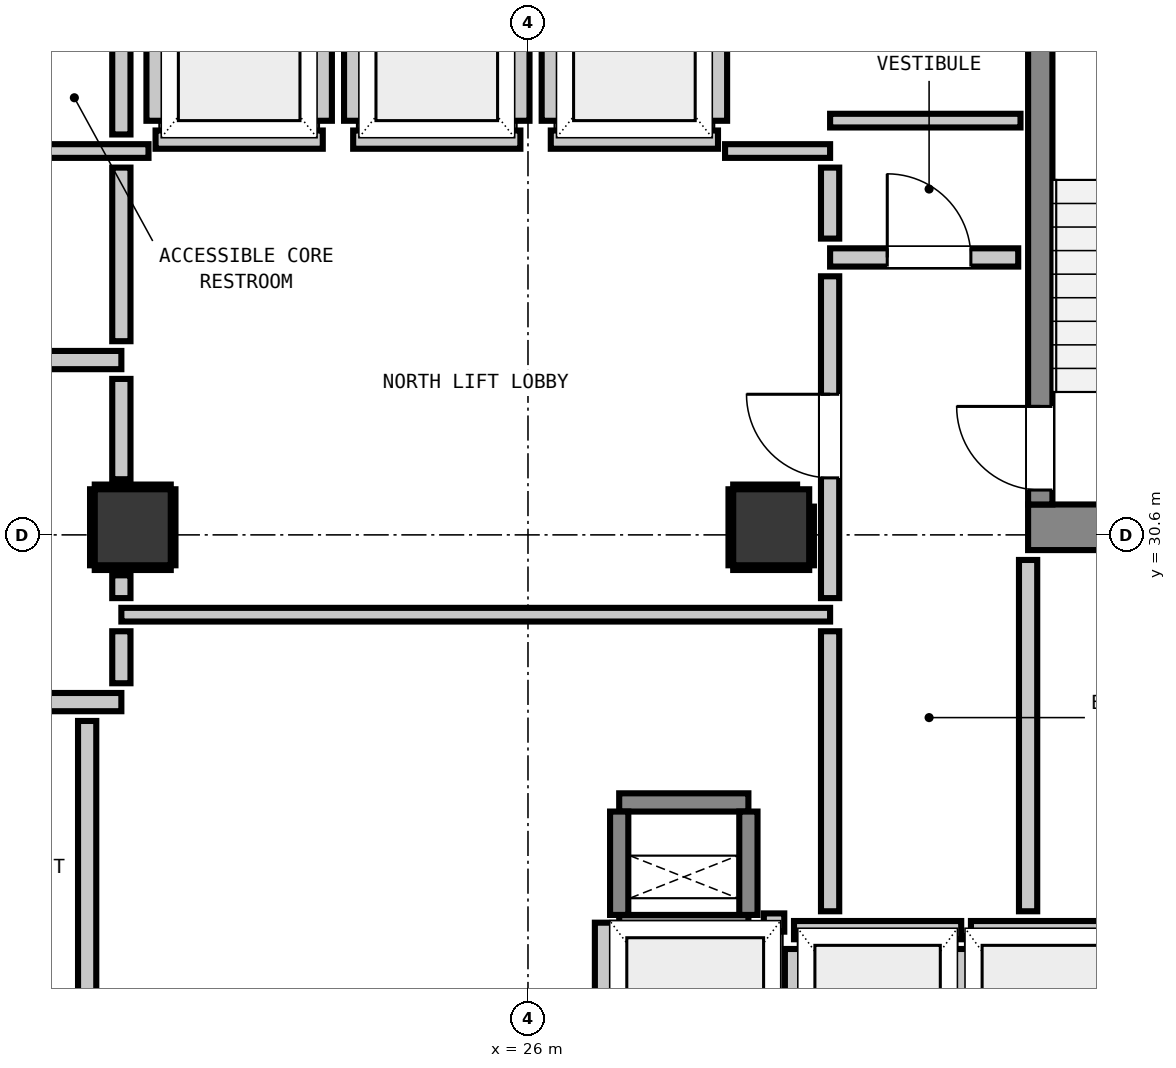
"""IFC4 building model, lengths in metres.
Left out: names, types, materials, properties, quantities, classifications, styles, units other than length and angle.
Written with IfcOpenShell. Run it as: python <this file> out.ifc"""

import sys

from ifc_helpers import new_model, si_unit, direction, frame, frame_2d, origin, origin_2d, place, context, subcontext, project, spatial, rectangle, extrude, element, fill, save


model = new_model("IFC4")
c1 = context("Model", 3, precision=1e-05, world=origin(), true_north=direction((0.0, 1.0)))
c2 = subcontext(c1, "Body", "Model", "MODEL_VIEW")
j1 = project(units=[si_unit("LENGTHUNIT", "METRE"), si_unit("PLANEANGLEUNIT", "RADIAN")], contexts=[c1])
p1 = place(None, origin())
s1 = spatial("IfcSite", under=j1, at=p1, CompositionType="ELEMENT")
p2 = place(p1, origin())
s2 = spatial("IfcBuilding", under=s1, at=p2, CompositionType="ELEMENT")
p3 = place(p2, frame((0.0, 0.0, 71.8)))
s3 = spatial("IfcBuildingStorey", under=s2, at=p3, CompositionType="ELEMENT", Elevation=71.8)
p4 = place(p3, frame((32.58, 30.7, 0.0), z_axis=(0.0, 0.0, 1.0), x_axis=(1.0, 0.0, 0.0)))
e1 = element("IfcWall", 1, at=p4, inside=s3, PredefinedType="SHEAR", context=c2, shape_type="SweptSolid", body=[
    extrude(rectangle(XDim=3.415, YDim=0.6, at=frame_2d((1.708, 0.0))), origin(), (0.0, 0.0, 1.0), 3.32),
])
p5 = place(p3, frame((32.74, 31.0, 0.0), z_axis=(0.0, 0.0, 1.0), x_axis=(0.0, 1.0, 0.0)))
e2 = element("IfcWall", 2, at=p5, inside=s3, PredefinedType="SHEAR", context=c2, shape_type="SweptSolid", body=[
    extrude(rectangle(XDim=7.8, YDim=0.32, at=frame_2d((3.9, 0.0))), origin(), (0.0, 0.0, 1.0), 3.32),
])
p6 = place(p5, frame((0.19, 0.0, 0.0)))
e3 = element("IfcOpeningElement", 3, at=p6, cuts=e2, PredefinedType="OPENING", context=c2, shape_type="SweptSolid", body=[
    extrude(rectangle(XDim=1.1, YDim=2.15, at=frame_2d((0.55, 1.075))), frame((0.0, 0.17, 0.0), z_axis=(0.0, -1.0, 0.0), x_axis=(1.0, 0.0, 0.0)), (0.0, 0.0, 1.0), 0.34),
])
for number, where, z_axis, x_axis in (
    (4, (27.2, 25.48, 0.0), (0.0, 0.0, 1.0), (1.0, 0.0, 0.0)),
    (5, (27.2, 27.08, 0.0), (0.0, 0.0, 1.0), (1.0, 0.0, 0.0)),
):
    element("IfcWall", number, at=place(p3, frame(where, z_axis=z_axis, x_axis=x_axis)), inside=s3, PredefinedType="SHEAR", context=c2, shape_type="SweptSolid", body=[
        extrude(rectangle(XDim=1.7, YDim=0.24, at=frame_2d((0.85, 0.0))), origin(), (0.0, 0.0, 1.0), 3.32),
    ])
for number, where, z_axis, x_axis in (
    (6, (27.2, 25.6, 0.0), (0.0, 0.0, 1.0), (0.0, 1.0, 0.0)),
    (7, (28.9, 25.6, 0.0), (0.0, 0.0, 1.0), (0.0, 1.0, 0.0)),
):
    element("IfcWall", number, at=place(p3, frame(where, z_axis=z_axis, x_axis=x_axis)), inside=s3, PredefinedType="SHEAR", context=c2, shape_type="SweptSolid", body=[
        extrude(rectangle(XDim=1.36, YDim=0.24, at=frame_2d((0.68, 0.0))), origin(), (0.0, 0.0, 1.0), 3.32),
    ])
for number, where, z_axis, x_axis in (
    (8, (20.8, 30.7, 0.0), (0.0, 0.0, 1.0), (1.0, 0.0, 0.0)),
    (9, (29.2, 30.7, 0.0), (0.0, 0.0, 1.0), (1.0, 0.0, 0.0)),
):
    element("IfcColumn", number, at=place(p3, frame(where, z_axis=z_axis, x_axis=x_axis)), inside=s3, PredefinedType="COLUMN", context=c2, shape_type="SweptSolid", body=[
        extrude(rectangle(XDim=1.0, YDim=1.0, at=origin_2d()), origin(), (0.0, 0.0, 1.0), 3.32),
    ])
p7 = place(p3, frame((21.1, 35.8, 0.0), z_axis=(0.0, 0.0, 1.0), x_axis=(1.0, 0.0, 0.0)))
e10 = element("IfcWall", 10, at=p7, inside=s3, PredefinedType="PARTITIONING", context=c2, shape_type="SweptSolid", body=[
    extrude(rectangle(XDim=2.2, YDim=0.24, at=frame_2d((1.1, 0.0))), origin(), (0.0, 0.0, 1.0), 3.06),
])
p8 = place(p3, frame((21.1, 36.048, 0.0), z_axis=(0.0, 0.0, 1.0), x_axis=(0.0, 1.0, 0.0)))
e11 = element("IfcWall", 11, at=p8, inside=s3, PredefinedType="PARTITIONING", context=c2, shape_type="SweptSolid", body=[
    extrude(rectangle(XDim=2.104, YDim=0.24, at=frame_2d((1.052, 0.0))), origin(), (0.0, 0.0, 1.0), 2.295),
])
p9 = place(p3, frame((23.3, 36.048, 0.0), z_axis=(0.0, 0.0, 1.0), x_axis=(0.0, 1.0, 0.0)))
e12 = element("IfcWall", 12, at=p9, inside=s3, PredefinedType="PARTITIONING", context=c2, shape_type="SweptSolid", body=[
    extrude(rectangle(XDim=2.104, YDim=0.24, at=frame_2d((1.052, 0.0))), origin(), (0.0, 0.0, 1.0), 3.06),
])
p10 = place(p3, frame((23.7, 35.8, 0.0), z_axis=(0.0, 0.0, 1.0), x_axis=(1.0, 0.0, 0.0)))
e13 = element("IfcWall", 13, at=p10, inside=s3, PredefinedType="PARTITIONING", context=c2, shape_type="SweptSolid", body=[
    extrude(rectangle(XDim=2.2, YDim=0.24, at=frame_2d((1.1, 0.0))), origin(), (0.0, 0.0, 1.0), 3.06),
])
for number, where, z_axis, x_axis in (
    (14, (23.7, 36.048, 0.0), (0.0, 0.0, 1.0), (0.0, 1.0, 0.0)),
    (15, (25.9, 36.048, 0.0), (0.0, 0.0, 1.0), (0.0, 1.0, 0.0)),
):
    element("IfcWall", number, at=place(p3, frame(where, z_axis=z_axis, x_axis=x_axis)), inside=s3, PredefinedType="PARTITIONING", context=c2, shape_type="SweptSolid", body=[
        extrude(rectangle(XDim=2.104, YDim=0.24, at=frame_2d((1.052, 0.0))), origin(), (0.0, 0.0, 1.0), 3.06),
    ])
p11 = place(p3, frame((26.3, 35.8, 0.0), z_axis=(0.0, 0.0, 1.0), x_axis=(1.0, 0.0, 0.0)))
e16 = element("IfcWall", 16, at=p11, inside=s3, PredefinedType="PARTITIONING", context=c2, shape_type="SweptSolid", body=[
    extrude(rectangle(XDim=2.2, YDim=0.24, at=frame_2d((1.1, 0.0))), origin(), (0.0, 0.0, 1.0), 3.06),
])
for number, where, z_axis, x_axis in (
    (17, (26.3, 36.048, 0.0), (0.0, 0.0, 1.0), (0.0, 1.0, 0.0)),
    (18, (28.5, 36.048, 0.0), (0.0, 0.0, 1.0), (0.0, 1.0, 0.0)),
):
    element("IfcWall", number, at=place(p3, frame(where, z_axis=z_axis, x_axis=x_axis)), inside=s3, PredefinedType="PARTITIONING", context=c2, shape_type="SweptSolid", body=[
        extrude(rectangle(XDim=2.104, YDim=0.24, at=frame_2d((1.052, 0.0))), origin(), (0.0, 0.0, 1.0), 3.06),
    ])
p12 = place(p3, frame((29.5, 25.4, 0.0), z_axis=(0.0, 0.0, 1.0), x_axis=(1.0, 0.0, 0.0)))
e19 = element("IfcWall", 19, at=p12, inside=s3, PredefinedType="PARTITIONING", context=c2, shape_type="SweptSolid", body=[
    extrude(rectangle(XDim=2.2, YDim=0.24, at=frame_2d((1.1, 0.0))), origin(), (0.0, 0.0, 1.0), 3.06),
])
p13 = place(p3, frame((29.5, 22.632, 0.0), z_axis=(0.0, 0.0, 1.0), x_axis=(0.0, 1.0, 0.0)))
e20 = element("IfcWall", 20, at=p13, inside=s3, PredefinedType="PARTITIONING", context=c2, shape_type="SweptSolid", body=[
    extrude(rectangle(XDim=2.52, YDim=0.24, at=frame_2d((1.26, 0.0))), origin(), (0.0, 0.0, 1.0), 2.295),
])
p14 = place(p3, frame((31.7, 22.73, 0.0), z_axis=(0.0, 0.0, 1.0), x_axis=(0.0, 1.0, 0.0)))
e21 = element("IfcWall", 21, at=p14, inside=s3, PredefinedType="PARTITIONING", context=c2, shape_type="SweptSolid", body=[
    extrude(rectangle(XDim=2.422, YDim=0.24, at=frame_2d((1.211, 0.0))), origin(), (0.0, 0.0, 1.0), 3.06),
])
p15 = place(p3, frame((31.828, 25.4, 0.0), z_axis=(0.0, 0.0, 1.0), x_axis=(1.0, 0.0, 0.0)))
e22 = element("IfcWall", 22, at=p15, inside=s3, PredefinedType="PARTITIONING", context=c2, shape_type="SweptSolid", body=[
    extrude(rectangle(XDim=2.072, YDim=0.24, at=frame_2d((1.036, 0.0))), origin(), (0.0, 0.0, 1.0), 3.06),
])
p16 = place(p3, frame((29.103, 25.5, 0.0), z_axis=(0.0, 0.0, 1.0), x_axis=(1.0, 0.0, 0.0)))
e23 = element("IfcWall", 23, at=p16, inside=s3, PredefinedType="PARTITIONING", context=c2, shape_type="SweptSolid", body=[
    extrude(rectangle(XDim=0.269, YDim=0.24, at=frame_2d((0.135, 0.0))), origin(), (0.0, 0.0, 1.0), 3.06),
])
p17 = place(p3, frame((27.0, 22.73, 0.0), z_axis=(0.0, 0.0, 1.0), x_axis=(0.0, 1.0, 0.0)))
e24 = element("IfcWall", 24, at=p17, inside=s3, PredefinedType="PARTITIONING", context=c2, shape_type="SweptSolid", body=[
    extrude(rectangle(XDim=2.768, YDim=0.24, at=frame_2d((1.384, 0.0))), origin(), (0.0, 0.0, 1.0), 3.06),
])
p18 = place(p3, frame((17.45, 28.4, 0.0), z_axis=(0.0, 0.0, 1.0), x_axis=(1.0, 0.0, 0.0)))
e25 = element("IfcWall", 25, at=p18, inside=s3, PredefinedType="PARTITIONING", context=c2, shape_type="SweptSolid", body=[
    extrude(rectangle(XDim=3.2, YDim=0.24, at=frame_2d((1.6, 0.0))), origin(), (0.0, 0.0, 1.0), 3.06),
])
p19 = place(p18, frame((0.784, 0.0, 0.0)))
e26 = element("IfcOpeningElement", 26, at=p19, cuts=e25, PredefinedType="OPENING", context=c2, shape_type="SweptSolid", body=[
    extrude(rectangle(XDim=1.1, YDim=2.15, at=frame_2d((0.55, 1.075))), frame((0.0, 0.13, 0.0), z_axis=(0.0, -1.0, 0.0), x_axis=(1.0, 0.0, 0.0)), (0.0, 0.0, 1.0), 0.26),
])
p20 = place(p3, frame((17.45, 32.9, 0.0), z_axis=(0.0, 0.0, 1.0), x_axis=(1.0, 0.0, 0.0)))
e27 = element("IfcWall", 27, at=p20, inside=s3, PredefinedType="PARTITIONING", context=c2, shape_type="SweptSolid", body=[
    extrude(rectangle(XDim=3.2, YDim=0.24, at=frame_2d((1.6, 0.0))), origin(), (0.0, 0.0, 1.0), 3.06),
])
p21 = place(p20, frame((0.159, 0.0, 0.0)))
e28 = element("IfcOpeningElement", 28, at=p21, cuts=e27, PredefinedType="OPENING", context=c2, shape_type="SweptSolid", body=[
    extrude(rectangle(XDim=1.1, YDim=2.15, at=frame_2d((0.55, 1.075))), frame((0.0, 0.13, 0.0), z_axis=(0.0, -1.0, 0.0), x_axis=(1.0, 0.0, 0.0)), (0.0, 0.0, 1.0), 0.26),
])
p22 = place(p3, frame((29.975, 34.25, 0.0), z_axis=(0.0, 0.0, 1.0), x_axis=(1.0, 0.0, 0.0)))
e29 = element("IfcWall", 29, at=p22, inside=s3, PredefinedType="PARTITIONING", context=c2, shape_type="SweptSolid", body=[
    extrude(rectangle(XDim=2.475, YDim=0.24, at=frame_2d((1.237, 0.0))), origin(), (0.0, 0.0, 1.0), 3.06),
])
p23 = place(p22, frame((0.752, 0.0, 0.0)))
e30 = element("IfcOpeningElement", 30, at=p23, cuts=e29, PredefinedType="OPENING", context=c2, shape_type="SweptSolid", body=[
    extrude(rectangle(XDim=1.1, YDim=2.15, at=frame_2d((0.55, 1.075))), frame((0.0, 0.13, 0.0), z_axis=(0.0, -1.0, 0.0), x_axis=(1.0, 0.0, 0.0)), (0.0, 0.0, 1.0), 0.26),
])
p24 = place(p3, frame((20.65, 29.55, 0.0), z_axis=(0.0, 0.0, 1.0), x_axis=(1.0, 0.0, 0.0)))
e31 = element("IfcWall", 31, at=p24, inside=s3, PredefinedType="PARTITIONING", context=c2, shape_type="SweptSolid", body=[
    extrude(rectangle(XDim=9.325, YDim=0.18, at=frame_2d((4.663, 0.0))), origin(), (0.0, 0.0, 1.0), 3.06),
])
p25 = place(p3, frame((18.95, 35.65, 0.0), z_axis=(0.0, 0.0, 1.0), x_axis=(1.0, 0.0, 0.0)))
e32 = element("IfcWall", 32, at=p25, inside=s3, PredefinedType="PARTITIONING", context=c2, shape_type="SweptSolid", body=[
    extrude(rectangle(XDim=2.057, YDim=0.18, at=frame_2d((1.029, 0.0))), origin(), (0.0, 0.0, 1.0), 3.06),
])
p26 = place(p3, frame((28.593, 35.65, 0.0), z_axis=(0.0, 0.0, 1.0), x_axis=(1.0, 0.0, 0.0)))
e33 = element("IfcWall", 33, at=p26, inside=s3, PredefinedType="PARTITIONING", context=c2, shape_type="SweptSolid", body=[
    extrude(rectangle(XDim=1.382, YDim=0.18, at=frame_2d((0.691, 0.0))), origin(), (0.0, 0.0, 1.0), 3.06),
])
p27 = place(p3, frame((29.975, 36.05, 0.0), z_axis=(0.0, 0.0, 1.0), x_axis=(1.0, 0.0, 0.0)))
e34 = element("IfcWall", 34, at=p27, inside=s3, PredefinedType="PARTITIONING", context=c2, shape_type="SweptSolid", body=[
    extrude(rectangle(XDim=2.505, YDim=0.18, at=frame_2d((1.252, 0.0))), origin(), (0.0, 0.0, 1.0), 3.06),
])
p28 = place(p3, frame((20.2, 22.586, 0.0), z_axis=(0.0, 0.0, 1.0), x_axis=(0.0, 1.0, 0.0)))
e35 = element("IfcWall", 35, at=p28, inside=s3, PredefinedType="PARTITIONING", context=c2, shape_type="SweptSolid", body=[
    extrude(rectangle(XDim=5.566, YDim=0.24, at=frame_2d((2.783, 0.0))), origin(), (0.0, 0.0, 1.0), 3.06),
])
p29 = place(p3, frame((20.65, 28.648, 0.0), z_axis=(0.0, 0.0, 1.0), x_axis=(0.0, 1.0, 0.0)))
e36 = element("IfcWall", 36, at=p29, inside=s3, PredefinedType="PARTITIONING", context=c2, shape_type="SweptSolid", body=[
    extrude(rectangle(XDim=0.684, YDim=0.24, at=frame_2d((0.342, 0.0))), origin(), (0.0, 0.0, 1.0), 2.295),
])
p30 = place(p3, frame((20.65, 29.768, 0.0), z_axis=(0.0, 0.0, 1.0), x_axis=(0.0, 1.0, 0.0)))
e37 = element("IfcWall", 37, at=p30, inside=s3, PredefinedType="PARTITIONING", context=c2, shape_type="SweptSolid", body=[
    extrude(rectangle(XDim=0.3, YDim=0.24, at=frame_2d((0.15, 0.0))), origin(), (0.0, 0.0, 1.0), 2.295),
])
p31 = place(p3, frame((20.65, 31.332, 0.0), z_axis=(0.0, 0.0, 1.0), x_axis=(0.0, 1.0, 0.0)))
e38 = element("IfcWall", 38, at=p31, inside=s3, PredefinedType="PARTITIONING", context=c2, shape_type="SweptSolid", body=[
    extrude(rectangle(XDim=1.32, YDim=0.24, at=frame_2d((0.66, 0.0))), origin(), (0.0, 0.0, 1.0), 2.295),
])
p32 = place(p3, frame((20.65, 33.148, 0.0), z_axis=(0.0, 0.0, 1.0), x_axis=(0.0, 1.0, 0.0)))
e39 = element("IfcWall", 39, at=p32, inside=s3, PredefinedType="PARTITIONING", context=c2, shape_type="SweptSolid", body=[
    extrude(rectangle(XDim=2.284, YDim=0.24, at=frame_2d((1.142, 0.0))), origin(), (0.0, 0.0, 1.0), 2.295),
])
p33 = place(p3, frame((20.65, 35.868, 0.0), z_axis=(0.0, 0.0, 1.0), x_axis=(0.0, 1.0, 0.0)))
e40 = element("IfcWall", 40, at=p33, inside=s3, PredefinedType="PARTITIONING", context=c2, shape_type="SweptSolid", body=[
    extrude(rectangle(XDim=2.684, YDim=0.24, at=frame_2d((1.342, 0.0))), origin(), (0.0, 0.0, 1.0), 2.295),
])
p34 = place(p3, frame((29.975, 25.648, 0.0), z_axis=(0.0, 0.0, 1.0), x_axis=(0.0, 1.0, 0.0)))
e41 = element("IfcWall", 41, at=p34, inside=s3, PredefinedType="PARTITIONING", context=c2, shape_type="SweptSolid", body=[
    extrude(rectangle(XDim=3.684, YDim=0.24, at=frame_2d((1.842, 0.0))), origin(), (0.0, 0.0, 1.0), 3.06),
])
p35 = place(p3, frame((29.975, 29.768, 0.0), z_axis=(0.0, 0.0, 1.0), x_axis=(0.0, 1.0, 0.0)))
e42 = element("IfcWall", 42, at=p35, inside=s3, PredefinedType="PARTITIONING", context=c2, shape_type="SweptSolid", body=[
    extrude(rectangle(XDim=4.234, YDim=0.24, at=frame_2d((2.117, 0.0))), origin(), (0.0, 0.0, 1.0), 3.06),
])
p36 = place(p35, frame((1.582, 0.0, 0.0)))
e43 = element("IfcOpeningElement", 43, at=p36, cuts=e42, PredefinedType="OPENING", context=c2, shape_type="SweptSolid", body=[
    extrude(rectangle(XDim=1.1, YDim=2.15, at=frame_2d((0.55, 1.075))), frame((0.0, 0.13, 0.0), z_axis=(0.0, -1.0, 0.0), x_axis=(1.0, 0.0, 0.0)), (0.0, 0.0, 1.0), 0.26),
])
p37 = place(p3, frame((29.975, 34.498, 0.0), z_axis=(0.0, 0.0, 1.0), x_axis=(0.0, 1.0, 0.0)))
e44 = element("IfcWall", 44, at=p37, inside=s3, PredefinedType="PARTITIONING", context=c2, shape_type="SweptSolid", body=[
    extrude(rectangle(XDim=0.934, YDim=0.24, at=frame_2d((0.467, 0.0))), origin(), (0.0, 0.0, 1.0), 3.06),
])
p38 = place(p3, frame((32.58, 25.648, 0.0), z_axis=(0.0, 0.0, 1.0), x_axis=(0.0, 1.0, 0.0)))
e45 = element("IfcWall", 45, at=p38, inside=s3, PredefinedType="PARTITIONING", context=c2, shape_type="SweptSolid", body=[
    extrude(rectangle(XDim=4.622, YDim=0.24, at=frame_2d((2.311, 0.0))), origin(), (0.0, 0.0, 1.0), 3.06),
])
for number, where, z_axis, x_axis in (
    (46, (20.3, 30.168, 0.0), (0.0, 0.0, 1.0), (1.0, 0.0, 0.0)),
    (47, (20.3, 31.232, 0.0), (0.0, 0.0, 1.0), (1.0, 0.0, 0.0)),
    (48, (20.268, 30.2, 0.0), (0.0, 0.0, 1.0), (0.0, 1.0, 0.0)),
    (49, (21.332, 30.2, 0.0), (0.0, 0.0, 1.0), (0.0, 1.0, 0.0)),
    (50, (28.7, 30.168, 0.0), (0.0, 0.0, 1.0), (1.0, 0.0, 0.0)),
):
    element("IfcWall", number, at=place(p3, frame(where, z_axis=z_axis, x_axis=x_axis)), inside=s3, PredefinedType="PARTITIONING", context=c2, shape_type="SweptSolid", body=[
        extrude(rectangle(XDim=1.0, YDim=0.06, at=frame_2d((0.5, 0.0))), origin(), (0.0, 0.0, 1.0), 1.45),
    ])
p39 = place(p3, frame((28.7, 31.232, 0.0), z_axis=(0.0, 0.0, 1.0), x_axis=(1.0, 0.0, 0.0)))
e51 = element("IfcWall", 51, at=p39, inside=s3, PredefinedType="PARTITIONING", context=c2, shape_type="SweptSolid", body=[
    extrude(rectangle(XDim=0.841, YDim=0.06, at=frame_2d((0.42, 0.0))), origin(), (0.0, 0.0, 1.0), 1.45),
])
p40 = place(p3, frame((28.668, 30.2, 0.0), z_axis=(0.0, 0.0, 1.0), x_axis=(0.0, 1.0, 0.0)))
e52 = element("IfcWall", 52, at=p40, inside=s3, PredefinedType="PARTITIONING", context=c2, shape_type="SweptSolid", body=[
    extrude(rectangle(XDim=1.0, YDim=0.06, at=frame_2d((0.5, 0.0))), origin(), (0.0, 0.0, 1.0), 1.45),
])
p41 = place(p3, frame((29.732, 30.2, 0.0), z_axis=(0.0, 0.0, 1.0), x_axis=(0.0, 1.0, 0.0)))
e53 = element("IfcWall", 53, at=p41, inside=s3, PredefinedType="PARTITIONING", context=c2, shape_type="SweptSolid", body=[
    extrude(rectangle(XDim=0.772, YDim=0.06, at=frame_2d((0.386, 0.0))), origin(), (0.0, 0.0, 1.0), 1.45),
])
p42 = place(p6, origin())
e54 = element("IfcDoor", 54, at=p42, inside=s3, OperationType="SINGLE_SWING_RIGHT", PredefinedType="DOOR", context=c2, shape_type="SweptSolid", body=[
    extrude(rectangle(XDim=1.1, YDim=2.15, at=frame_2d((0.55, 1.075))), frame((0.0, 0.025, 0.0), z_axis=(0.0, -1.0, 0.0), x_axis=(1.0, 0.0, 0.0)), (0.0, 0.0, 1.0), 0.05),
])
fill(e3, e54)
p43 = place(p36, origin())
e55 = element("IfcDoor", 55, at=p43, inside=s3, OperationType="SINGLE_SWING_RIGHT", PredefinedType="DOOR", context=c2, shape_type="SweptSolid", body=[
    extrude(rectangle(XDim=1.1, YDim=2.15, at=frame_2d((0.55, 1.075))), frame((0.0, 0.025, 0.0), z_axis=(0.0, -1.0, 0.0), x_axis=(1.0, 0.0, 0.0)), (0.0, 0.0, 1.0), 0.05),
])
fill(e43, e55)
p44 = place(p23, origin())
e56 = element("IfcDoor", 56, at=p44, inside=s3, OperationType="SINGLE_SWING_LEFT", PredefinedType="DOOR", context=c2, shape_type="SweptSolid", body=[
    extrude(rectangle(XDim=1.1, YDim=2.15, at=frame_2d((0.55, 1.075))), frame((0.0, 0.025, 0.0), z_axis=(0.0, -1.0, 0.0), x_axis=(1.0, 0.0, 0.0)), (0.0, 0.0, 1.0), 0.05),
])
fill(e30, e56)
save(model, sys.argv[1])
